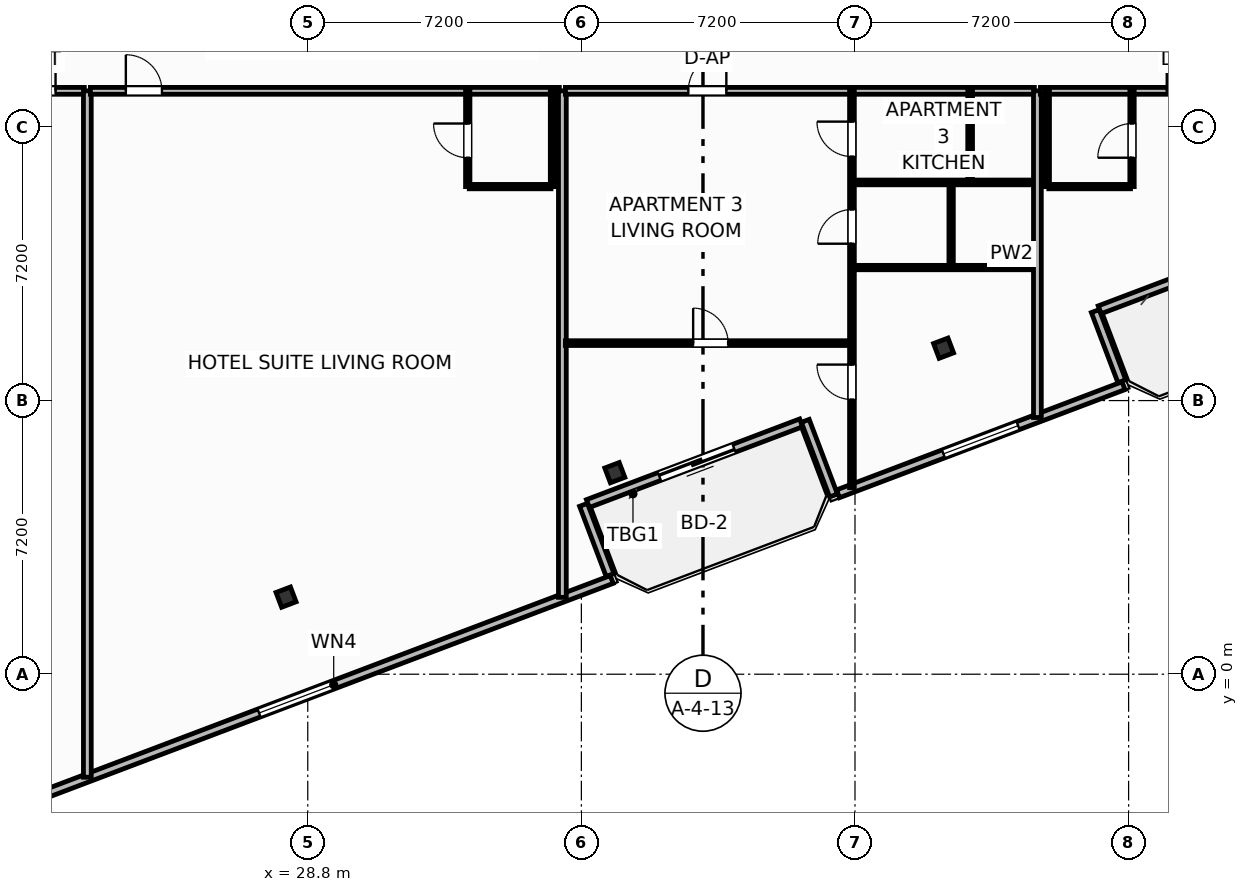
"""IFC4 building model, lengths in metres.
Left out: names, types, materials, properties, quantities, classifications, styles, units other than length and angle.
Written with IfcOpenShell. Run it as: python <this file> out.ifc"""

import sys

from ifc_helpers import new_model, si_unit, direction, frame, frame_2d, origin, origin_2d, place, context, subcontext, project, spatial, rectangle, i_section, extrude, element, fill, save


model = new_model("IFC4")
c1 = context("Model", 3, precision=1e-05, world=origin(), true_north=direction((0.0, 1.0)))
c2 = subcontext(c1, "Body", "Model", "MODEL_VIEW")
j1 = project(units=[si_unit("LENGTHUNIT", "METRE"), si_unit("PLANEANGLEUNIT", "RADIAN")], contexts=[c1])
p1 = place(None, origin())
s1 = spatial("IfcSite", under=j1, at=p1, CompositionType="ELEMENT")
p2 = place(p1, origin())
s2 = spatial("IfcBuilding", under=s1, at=p2, CompositionType="ELEMENT")
p3 = place(p2, frame((0.0, 0.0, 227.5)))
s3 = spatial("IfcBuildingStorey", under=s2, at=p3, CompositionType="ELEMENT", Elevation=227.5)
for number, where, z_axis, x_axis in (
    (1, (28.229, 2.028, 0.0), (0.0, 0.0, 1.0), (0.935, 0.354, 0.0)),
    (2, (36.88, 5.303, 0.0), (0.0, 0.0, 1.0), (0.935, 0.354, 0.0)),
    (3, (45.531, 8.578, 0.0), (0.0, 0.0, 1.0), (0.935, 0.354, 0.0)),
):
    element("IfcColumn", number, at=place(p3, frame(where, z_axis=z_axis, x_axis=x_axis)), inside=s3, PredefinedType="COLUMN", context=c2, shape_type="SweptSolid", body=[
        extrude(i_section(OverallWidth=0.406, OverallDepth=0.416, WebThickness=0.03, FlangeThickness=0.048, FilletRadius=0.025, at=origin_2d()), origin(), (0.0, 0.0, 1.0), 3.7),
    ])
p4 = place(p3, frame((41.783, 6.614, 0.0), z_axis=(0.0, 0.0, 1.0), x_axis=(-0.93521416643, -0.354082565101, 0.0)))
e4 = element("IfcWall", 4, at=p4, inside=s3, PredefinedType="SOLIDWALL", context=c2, shape_type="SweptSolid", body=[
    extrude(rectangle(XDim=6.0, YDim=0.22, at=frame_2d((3.0, 0.0))), origin(), (0.0, 0.0, 1.0), 2.73),
])
p5 = place(p4, frame((1.888, 0.0, 0.0)))
e5 = element("IfcOpeningElement", 5, at=p5, cuts=e4, PredefinedType="OPENING", context=c2, shape_type="SweptSolid", body=[
    extrude(rectangle(XDim=2.1, YDim=2.3, at=frame_2d((1.05, 1.15))), frame((0.0, 0.12, 0.0), z_axis=(0.0, -1.0, 0.0), x_axis=(1.0, 0.0, 0.0)), (0.0, 0.0, 1.0), 0.24),
])
p6 = place(p3, frame((55.25, 11.713, 0.0), z_axis=(0.0, 0.0, 1.0), x_axis=(-0.935227640088, -0.354046976001, 0.0)))
e6 = element("IfcWall", 6, at=p6, inside=s3, PredefinedType="SOLIDWALL", context=c2, shape_type="SweptSolid", body=[
    extrude(rectangle(XDim=6.0, YDim=0.22, at=frame_2d((3.0, 0.0))), origin(), (0.0, 0.0, 1.0), 2.73),
])
p7 = place(p6, frame((1.888, 0.0, 0.0)))
e7 = element("IfcOpeningElement", 7, at=p7, cuts=e6, PredefinedType="OPENING", context=c2, shape_type="SweptSolid", body=[
    extrude(rectangle(XDim=2.1, YDim=2.3, at=frame_2d((1.05, 1.15))), frame((0.0, 0.12, 0.0), z_axis=(0.0, -1.0, 0.0), x_axis=(1.0, 0.0, 0.0)), (0.0, 0.0, 1.0), 0.24),
])
p8 = place(p3, frame((20.202, -3.791, 0.0), z_axis=(0.0, 0.0, 1.0), x_axis=(0.935225574232, 0.354052432984, 0.0)))
e8 = element("IfcWall", 8, at=p8, inside=s3, PredefinedType="SOLIDWALL", context=c2, shape_type="SweptSolid", body=[
    extrude(rectangle(XDim=17.747, YDim=0.22, at=frame_2d((8.874, 0.0))), origin(), (0.0, 0.0, 1.0), 2.73),
])
p9 = place(p8, frame((7.823, 0.0, 0.8)))
e9 = element("IfcOpeningElement", 9, at=p9, cuts=e8, PredefinedType="OPENING", context=c2, shape_type="SweptSolid", body=[
    extrude(rectangle(XDim=2.1, YDim=1.75, at=frame_2d((1.05, 0.875))), frame((0.0, 0.12, 0.0), z_axis=(0.0, -1.0, 0.0), x_axis=(1.0, 0.0, 0.0)), (0.0, 0.0, 1.0), 0.24),
])
p10 = place(p3, frame((36.755, 2.61, 0.0), z_axis=(0.0, 0.0, 1.0), x_axis=(-0.354020680661, 0.935237594232, 0.0)))
e10 = element("IfcWall", 10, at=p10, inside=s3, PredefinedType="SOLIDWALL", context=c2, shape_type="SweptSolid", body=[
    extrude(rectangle(XDim=1.975, YDim=0.22, at=frame_2d((0.988, 0.0))), origin(), (0.0, 0.0, 1.0), 2.73),
])
p11 = place(p3, frame((41.892, 6.666, 0.0), z_axis=(0.0, 0.0, 1.0), x_axis=(0.354128469405, -0.935196785258, 0.0)))
e11 = element("IfcWall", 11, at=p11, inside=s3, PredefinedType="SOLIDWALL", context=c2, shape_type="SweptSolid", body=[
    extrude(rectangle(XDim=2.1, YDim=0.22, at=frame_2d((1.05, 0.0))), origin(), (0.0, 0.0, 1.0), 2.73),
])
p12 = place(p3, frame((42.752, 4.746, 0.0), z_axis=(0.0, 0.0, 1.0), x_axis=(0.935216926991, 0.354075273733, 0.0)))
e12 = element("IfcWall", 12, at=p12, inside=s3, PredefinedType="SOLIDWALL", context=c2, shape_type="SweptSolid", body=[
    extrude(rectangle(XDim=8.035, YDim=0.22, at=frame_2d((4.018, 0.0))), origin(), (0.0, 0.0, 1.0), 2.73),
])
p13 = place(p12, frame((2.968, 0.0, 0.8)))
e13 = element("IfcOpeningElement", 13, at=p13, cuts=e12, PredefinedType="OPENING", context=c2, shape_type="SweptSolid", body=[
    extrude(rectangle(XDim=2.1, YDim=1.75, at=frame_2d((1.05, 0.875))), frame((0.0, 0.12, 0.0), z_axis=(0.0, -1.0, 0.0), x_axis=(1.0, 0.0, 0.0)), (0.0, 0.0, 1.0), 0.24),
])
p14 = place(p3, frame((50.223, 7.708, 0.0), z_axis=(0.0, 0.0, 1.0), x_axis=(-0.354020680661, 0.935237594232, 0.0)))
e14 = element("IfcWall", 14, at=p14, inside=s3, PredefinedType="SOLIDWALL", context=c2, shape_type="SweptSolid", body=[
    extrude(rectangle(XDim=1.975, YDim=0.22, at=frame_2d((0.988, 0.0))), origin(), (0.0, 0.0, 1.0), 2.73),
])
p15 = place(p3, frame((7.764, 15.35, 0.0), z_axis=(0.0, 0.0, 1.0), x_axis=(1.0, 0.0, 0.0)))
e15 = element("IfcWall", 15, at=p15, inside=s3, PredefinedType="PARTITIONING", context=c2, shape_type="SweptSolid", body=[
    extrude(rectangle(XDim=15.156, YDim=0.18, at=frame_2d((7.578, 0.0))), origin(), (0.0, 0.0, 1.0), 3.45),
])
p16 = place(p15, frame((13.45, 0.0, 0.0)))
e16 = element("IfcOpeningElement", 16, at=p16, cuts=e15, PredefinedType="OPENING", context=c2, shape_type="SweptSolid", body=[
    extrude(rectangle(XDim=0.95, YDim=2.15, at=frame_2d((0.475, 1.075))), frame((0.0, 0.1, 0.0), z_axis=(0.0, -1.0, 0.0), x_axis=(1.0, 0.0, 0.0)), (0.0, 0.0, 1.0), 0.2),
])
p17 = place(p3, frame((23.0, -2.71, 0.0), z_axis=(0.0, 0.0, 1.0), x_axis=(0.0, 1.0, 0.0)))
e17 = element("IfcWall", 17, at=p17, inside=s3, PredefinedType="PARTITIONING", context=c2, shape_type="SweptSolid", body=[
    extrude(rectangle(XDim=18.06, YDim=0.205, at=frame_2d((9.03, 0.0))), origin(), (0.0, 0.0, 1.0), 3.45),
])
p18 = place(p3, frame((23.08, 15.35, 0.0), z_axis=(0.0, 0.0, 1.0), x_axis=(1.0, 0.0, 0.0)))
e18 = element("IfcWall", 18, at=p18, inside=s3, PredefinedType="PARTITIONING", context=c2, shape_type="SweptSolid", body=[
    extrude(rectangle(XDim=12.34, YDim=0.18, at=frame_2d((6.17, 0.0))), origin(), (0.0, 0.0, 1.0), 3.45),
])
p19 = place(p18, frame((0.933, 0.0, 0.0)))
e19 = element("IfcOpeningElement", 19, at=p19, cuts=e18, PredefinedType="OPENING", context=c2, shape_type="SweptSolid", body=[
    extrude(rectangle(XDim=0.95, YDim=2.15, at=frame_2d((0.475, 1.075))), frame((0.0, 0.1, 0.0), z_axis=(0.0, -1.0, 0.0), x_axis=(1.0, 0.0, 0.0)), (0.0, 0.0, 1.0), 0.2),
])
p20 = place(p3, frame((33.05, 12.83, 0.0), z_axis=(0.0, 0.0, 1.0), x_axis=(1.0, 0.0, 0.0)))
e20 = element("IfcWall", 20, at=p20, inside=s3, PredefinedType="PARTITIONING", context=c2, shape_type="SweptSolid", body=[
    extrude(rectangle(XDim=2.15, YDim=0.115, at=frame_2d((1.075, 0.0))), origin(), (0.0, 0.0, 1.0), 3.45),
])
p21 = place(p3, frame((33.01, 12.83, 0.0), z_axis=(0.0, 0.0, 1.0), x_axis=(0.0, 1.0, 0.0)))
e21 = element("IfcWall", 21, at=p21, inside=s3, PredefinedType="PARTITIONING", context=c2, shape_type="SweptSolid", body=[
    extrude(rectangle(XDim=2.52, YDim=0.115, at=frame_2d((1.26, 0.0))), origin(), (0.0, 0.0, 1.0), 3.45),
])
p22 = place(p21, frame((0.76, 0.0, 0.0)))
e22 = element("IfcOpeningElement", 22, at=p22, cuts=e21, PredefinedType="OPENING", context=c2, shape_type="SweptSolid", body=[
    extrude(rectangle(XDim=0.9, YDim=2.05, at=frame_2d((0.45, 1.025))), frame((0.0, 0.067, 0.0), z_axis=(0.0, -1.0, 0.0), x_axis=(1.0, 0.0, 0.0)), (0.0, 0.0, 1.0), 0.135),
])
p23 = place(p3, frame((35.24, 12.83, 0.0), z_axis=(0.0, 0.0, 1.0), x_axis=(0.0, 1.0, 0.0)))
e23 = element("IfcWall", 23, at=p23, inside=s3, PredefinedType="PARTITIONING", context=c2, shape_type="SweptSolid", body=[
    extrude(rectangle(XDim=2.52, YDim=0.115, at=frame_2d((1.26, 0.0))), origin(), (0.0, 0.0, 1.0), 2.739),
])
p24 = place(p3, frame((35.5, 2.022, 0.0), z_axis=(0.0, 0.0, 1.0), x_axis=(0.0, 1.0, 0.0)))
e24 = element("IfcWall", 24, at=p24, inside=s3, PredefinedType="PARTITIONING", context=c2, shape_type="SweptSolid", body=[
    extrude(rectangle(XDim=13.328, YDim=0.205, at=frame_2d((6.664, 0.0))), origin(), (0.0, 0.0, 1.0), 2.739),
])
p25 = place(p3, frame((35.58, 8.712, 0.0), z_axis=(0.0, 0.0, 1.0), x_axis=(1.0, 0.0, 0.0)))
e25 = element("IfcWall", 25, at=p25, inside=s3, PredefinedType="PARTITIONING", context=c2, shape_type="SweptSolid", body=[
    extrude(rectangle(XDim=7.47, YDim=0.125, at=frame_2d((3.735, 0.0))), origin(), (0.0, 0.0, 1.0), 3.45),
])
p26 = place(p25, frame((3.362, 0.0, 0.0)))
e26 = element("IfcOpeningElement", 26, at=p26, cuts=e25, PredefinedType="OPENING", context=c2, shape_type="SweptSolid", body=[
    extrude(rectangle(XDim=0.92, YDim=2.05, at=frame_2d((0.46, 1.025))), frame((0.0, 0.073, 0.0), z_axis=(0.0, -1.0, 0.0), x_axis=(1.0, 0.0, 0.0)), (0.0, 0.0, 1.0), 0.145),
])
p27 = place(p3, frame((35.58, 15.35, 0.0), z_axis=(0.0, 0.0, 1.0), x_axis=(1.0, 0.0, 0.0)))
e27 = element("IfcWall", 27, at=p27, inside=s3, PredefinedType="PARTITIONING", context=c2, shape_type="SweptSolid", body=[
    extrude(rectangle(XDim=12.34, YDim=0.18, at=frame_2d((6.17, 0.0))), origin(), (0.0, 0.0, 1.0), 3.45),
])
p28 = place(p27, frame((3.235, 0.0, 0.0)))
e28 = element("IfcOpeningElement", 28, at=p28, cuts=e27, PredefinedType="OPENING", context=c2, shape_type="SweptSolid", body=[
    extrude(rectangle(XDim=1.0, YDim=2.2, at=frame_2d((0.5, 1.1))), frame((0.0, 0.1, 0.0), z_axis=(0.0, -1.0, 0.0), x_axis=(1.0, 0.0, 0.0)), (0.0, 0.0, 1.0), 0.2),
])
p29 = place(p3, frame((43.12, 4.907, 0.0), z_axis=(0.0, 0.0, 1.0), x_axis=(0.0, 1.0, 0.0)))
e29 = element("IfcWall", 29, at=p29, inside=s3, PredefinedType="PARTITIONING", context=c2, shape_type="SweptSolid", body=[
    extrude(rectangle(XDim=10.443, YDim=0.125, at=frame_2d((5.222, 0.0))), origin(), (0.0, 0.0, 1.0), 3.45),
])
p30 = place(p29, frame((2.32, 0.0, 0.0)))
e30 = element("IfcOpeningElement", 30, at=p30, cuts=e29, PredefinedType="OPENING", context=c2, shape_type="SweptSolid", body=[
    extrude(rectangle(XDim=0.92, YDim=2.05, at=frame_2d((0.46, 1.025))), frame((0.0, 0.073, 0.0), z_axis=(0.0, -1.0, 0.0), x_axis=(1.0, 0.0, 0.0)), (0.0, 0.0, 1.0), 0.145),
])
p31 = place(p29, frame((6.42, 0.0, 0.0)))
e31 = element("IfcOpeningElement", 31, at=p31, cuts=e29, PredefinedType="OPENING", context=c2, shape_type="SweptSolid", body=[
    extrude(rectangle(XDim=0.9, YDim=2.05, at=frame_2d((0.45, 1.025))), frame((0.0, 0.073, 0.0), z_axis=(0.0, -1.0, 0.0), x_axis=(1.0, 0.0, 0.0)), (0.0, 0.0, 1.0), 0.145),
])
p32 = place(p29, frame((8.713, 0.0, 0.0)))
e32 = element("IfcOpeningElement", 32, at=p32, cuts=e29, PredefinedType="OPENING", context=c2, shape_type="SweptSolid", body=[
    extrude(rectangle(XDim=0.92, YDim=2.05, at=frame_2d((0.46, 1.025))), frame((0.0, 0.073, 0.0), z_axis=(0.0, -1.0, 0.0), x_axis=(1.0, 0.0, 0.0)), (0.0, 0.0, 1.0), 0.145),
])
p33 = place(p3, frame((43.19, 12.94, 0.0), z_axis=(0.0, 0.0, 1.0), x_axis=(1.0, 0.0, 0.0)))
e33 = element("IfcWall", 33, at=p33, inside=s3, PredefinedType="PARTITIONING", context=c2, shape_type="SweptSolid", body=[
    extrude(rectangle(XDim=4.73, YDim=0.125, at=frame_2d((2.365, 0.0))), origin(), (0.0, 0.0, 1.0), 3.018),
])
p34 = place(p3, frame((43.19, 10.7, 0.0), z_axis=(0.0, 0.0, 1.0), x_axis=(1.0, 0.0, 0.0)))
e34 = element("IfcWall", 34, at=p34, inside=s3, PredefinedType="PARTITIONING", context=c2, shape_type="SweptSolid", body=[
    extrude(rectangle(XDim=4.73, YDim=0.115, at=frame_2d((2.365, 0.0))), origin(), (0.0, 0.0, 1.0), 3.45),
])
p35 = place(p3, frame((46.23, 12.94, 0.0), z_axis=(0.0, 0.0, 1.0), x_axis=(0.0, 1.0, 0.0)))
e35 = element("IfcWall", 35, at=p35, inside=s3, PredefinedType="PARTITIONING", context=c2, shape_type="SweptSolid", body=[
    extrude(rectangle(XDim=2.41, YDim=0.125, at=frame_2d((1.205, 0.0))), origin(), (0.0, 0.0, 1.0), 3.45),
])
p36 = place(p3, frame((45.73, 10.7, 0.0), z_axis=(0.0, 0.0, 1.0), x_axis=(0.0, 1.0, 0.0)))
e36 = element("IfcWall", 36, at=p36, inside=s3, PredefinedType="PARTITIONING", context=c2, shape_type="SweptSolid", body=[
    extrude(rectangle(XDim=2.24, YDim=0.115, at=frame_2d((1.12, 0.0))), origin(), (0.0, 0.0, 1.0), 3.45),
])
p37 = place(p3, frame((48.0, 6.754, 0.0), z_axis=(0.0, 0.0, 1.0), x_axis=(0.0, 1.0, 0.0)))
e37 = element("IfcWall", 37, at=p37, inside=s3, PredefinedType="PARTITIONING", context=c2, shape_type="SweptSolid", body=[
    extrude(rectangle(XDim=8.596, YDim=0.205, at=frame_2d((4.298, 0.0))), origin(), (0.0, 0.0, 1.0), 3.45),
])
p38 = place(p3, frame((48.08, 15.35, 0.0), z_axis=(0.0, 0.0, 1.0), x_axis=(1.0, 0.0, 0.0)))
e38 = element("IfcWall", 38, at=p38, inside=s3, PredefinedType="PARTITIONING", context=c2, shape_type="SweptSolid", body=[
    extrude(rectangle(XDim=22.624, YDim=0.18, at=frame_2d((11.312, 0.0))), origin(), (0.0, 0.0, 1.0), 3.45),
])
p39 = place(p38, frame((3.324, 0.0, 0.0)))
e39 = element("IfcOpeningElement", 39, at=p39, cuts=e38, PredefinedType="OPENING", context=c2, shape_type="SweptSolid", body=[
    extrude(rectangle(XDim=0.95, YDim=2.15, at=frame_2d((0.475, 1.075))), frame((0.0, 0.1, 0.0), z_axis=(0.0, -1.0, 0.0), x_axis=(1.0, 0.0, 0.0)), (0.0, 0.0, 1.0), 0.2),
])
p40 = place(p3, frame((48.3, 12.83, 0.0), z_axis=(0.0, 0.0, 1.0), x_axis=(1.0, 0.0, 0.0)))
e40 = element("IfcWall", 40, at=p40, inside=s3, PredefinedType="PARTITIONING", context=c2, shape_type="SweptSolid", body=[
    extrude(rectangle(XDim=2.15, YDim=0.115, at=frame_2d((1.075, 0.0))), origin(), (0.0, 0.0, 1.0), 3.45),
])
p41 = place(p3, frame((50.49, 12.83, 0.0), z_axis=(0.0, 0.0, 1.0), x_axis=(0.0, 1.0, 0.0)))
e41 = element("IfcWall", 41, at=p41, inside=s3, PredefinedType="PARTITIONING", context=c2, shape_type="SweptSolid", body=[
    extrude(rectangle(XDim=2.52, YDim=0.115, at=frame_2d((1.26, 0.0))), origin(), (0.0, 0.0, 1.0), 3.45),
])
p42 = place(p41, frame((0.76, 0.0, 0.0)))
e42 = element("IfcOpeningElement", 42, at=p42, cuts=e41, PredefinedType="OPENING", context=c2, shape_type="SweptSolid", body=[
    extrude(rectangle(XDim=0.9, YDim=2.05, at=frame_2d((0.45, 1.025))), frame((0.0, 0.067, 0.0), z_axis=(0.0, -1.0, 0.0), x_axis=(1.0, 0.0, 0.0)), (0.0, 0.0, 1.0), 0.135),
])
p43 = place(p3, frame((48.26, 12.83, 0.0), z_axis=(0.0, 0.0, 1.0), x_axis=(0.0, 1.0, 0.0)))
e43 = element("IfcWall", 43, at=p43, inside=s3, PredefinedType="PARTITIONING", context=c2, shape_type="SweptSolid", body=[
    extrude(rectangle(XDim=2.52, YDim=0.115, at=frame_2d((1.26, 0.0))), origin(), (0.0, 0.0, 1.0), 3.45),
])
p44 = place(p5, origin())
e44 = element("IfcDoor", 44, at=p44, inside=s3, OperationType="SLIDING_TO_LEFT", PredefinedType="DOOR", context=c2, shape_type="SweptSolid", body=[
    extrude(rectangle(XDim=2.1, YDim=2.3, at=frame_2d((1.05, 1.15))), frame((0.0, 0.025, 0.0), z_axis=(0.0, -1.0, 0.0), x_axis=(1.0, 0.0, 0.0)), (0.0, 0.0, 1.0), 0.05),
])
fill(e5, e44)
p45 = place(p9, origin())
e45 = element("IfcWindow", 45, at=p45, inside=s3, PartitioningType="SINGLE_PANEL", PredefinedType="WINDOW", context=c2, shape_type="SweptSolid", body=[
    extrude(rectangle(XDim=2.1, YDim=1.75, at=frame_2d((1.05, 0.875))), frame((0.0, 0.03, 0.0), z_axis=(0.0, -1.0, 0.0), x_axis=(1.0, 0.0, 0.0)), (0.0, 0.0, 1.0), 0.06),
])
fill(e9, e45)
p46 = place(p13, origin())
e46 = element("IfcWindow", 46, at=p46, inside=s3, PartitioningType="SINGLE_PANEL", PredefinedType="WINDOW", context=c2, shape_type="SweptSolid", body=[
    extrude(rectangle(XDim=2.1, YDim=1.75, at=frame_2d((1.05, 0.875))), frame((0.0, 0.03, 0.0), z_axis=(0.0, -1.0, 0.0), x_axis=(1.0, 0.0, 0.0)), (0.0, 0.0, 1.0), 0.06),
])
fill(e13, e46)
p47 = place(p16, origin())
e47 = element("IfcDoor", 47, at=p47, inside=s3, OperationType="SINGLE_SWING_RIGHT", PredefinedType="DOOR", context=c2, shape_type="SweptSolid", body=[
    extrude(rectangle(XDim=0.95, YDim=2.15, at=frame_2d((0.475, 1.075))), frame((0.0, 0.025, 0.0), z_axis=(0.0, -1.0, 0.0), x_axis=(1.0, 0.0, 0.0)), (0.0, 0.0, 1.0), 0.05),
])
fill(e16, e47)
p48 = place(p19, origin())
e48 = element("IfcDoor", 48, at=p48, inside=s3, OperationType="SINGLE_SWING_LEFT", PredefinedType="DOOR", context=c2, shape_type="SweptSolid", body=[
    extrude(rectangle(XDim=0.95, YDim=2.15, at=frame_2d((0.475, 1.075))), frame((0.0, 0.025, 0.0), z_axis=(0.0, -1.0, 0.0), x_axis=(1.0, 0.0, 0.0)), (0.0, 0.0, 1.0), 0.05),
])
fill(e19, e48)
p49 = place(p22, origin())
e49 = element("IfcDoor", 49, at=p49, inside=s3, OperationType="SINGLE_SWING_RIGHT", PredefinedType="DOOR", context=c2, shape_type="SweptSolid", body=[
    extrude(rectangle(XDim=0.9, YDim=2.05, at=frame_2d((0.45, 1.025))), frame((0.0, 0.025, 0.0), z_axis=(0.0, -1.0, 0.0), x_axis=(1.0, 0.0, 0.0)), (0.0, 0.0, 1.0), 0.05),
])
fill(e22, e49)
p50 = place(p26, origin())
e50 = element("IfcDoor", 50, at=p50, inside=s3, OperationType="SINGLE_SWING_LEFT", PredefinedType="DOOR", context=c2, shape_type="SweptSolid", body=[
    extrude(rectangle(XDim=0.92, YDim=2.05, at=frame_2d((0.46, 1.025))), frame((0.0, 0.025, 0.0), z_axis=(0.0, -1.0, 0.0), x_axis=(1.0, 0.0, 0.0)), (0.0, 0.0, 1.0), 0.05),
])
fill(e26, e50)
p51 = place(p28, origin())
e51 = element("IfcDoor", 51, at=p51, inside=s3, OperationType="SINGLE_SWING_RIGHT", PredefinedType="DOOR", context=c2, shape_type="SweptSolid", body=[
    extrude(rectangle(XDim=1.0, YDim=2.2, at=frame_2d((0.5, 1.1))), frame((0.0, 0.025, 0.0), z_axis=(0.0, -1.0, 0.0), x_axis=(1.0, 0.0, 0.0)), (0.0, 0.0, 1.0), 0.05),
])
fill(e28, e51)
p52 = place(p30, origin())
e52 = element("IfcDoor", 52, at=p52, inside=s3, OperationType="SINGLE_SWING_RIGHT", PredefinedType="DOOR", context=c2, shape_type="SweptSolid", body=[
    extrude(rectangle(XDim=0.92, YDim=2.05, at=frame_2d((0.46, 1.025))), frame((0.0, 0.025, 0.0), z_axis=(0.0, -1.0, 0.0), x_axis=(1.0, 0.0, 0.0)), (0.0, 0.0, 1.0), 0.05),
])
fill(e30, e52)
p53 = place(p31, origin())
e53 = element("IfcDoor", 53, at=p53, inside=s3, OperationType="SINGLE_SWING_LEFT", PredefinedType="DOOR", context=c2, shape_type="SweptSolid", body=[
    extrude(rectangle(XDim=0.9, YDim=2.05, at=frame_2d((0.45, 1.025))), frame((0.0, 0.025, 0.0), z_axis=(0.0, -1.0, 0.0), x_axis=(1.0, 0.0, 0.0)), (0.0, 0.0, 1.0), 0.05),
])
fill(e31, e53)
p54 = place(p32, origin())
e54 = element("IfcDoor", 54, at=p54, inside=s3, OperationType="SINGLE_SWING_RIGHT", PredefinedType="DOOR", context=c2, shape_type="SweptSolid", body=[
    extrude(rectangle(XDim=0.92, YDim=2.05, at=frame_2d((0.46, 1.025))), frame((0.0, 0.025, 0.0), z_axis=(0.0, -1.0, 0.0), x_axis=(1.0, 0.0, 0.0)), (0.0, 0.0, 1.0), 0.05),
])
fill(e32, e54)
p55 = place(p39, origin())
e55 = element("IfcDoor", 55, at=p55, inside=s3, OperationType="SINGLE_SWING_LEFT", PredefinedType="DOOR", context=c2, shape_type="SweptSolid", body=[
    extrude(rectangle(XDim=0.95, YDim=2.15, at=frame_2d((0.475, 1.075))), frame((0.0, 0.025, 0.0), z_axis=(0.0, -1.0, 0.0), x_axis=(1.0, 0.0, 0.0)), (0.0, 0.0, 1.0), 0.05),
])
fill(e39, e55)
p56 = place(p42, origin())
e56 = element("IfcDoor", 56, at=p56, inside=s3, OperationType="SINGLE_SWING_LEFT", PredefinedType="DOOR", context=c2, shape_type="SweptSolid", body=[
    extrude(rectangle(XDim=0.9, YDim=2.05, at=frame_2d((0.45, 1.025))), frame((0.0, 0.025, 0.0), z_axis=(0.0, -1.0, 0.0), x_axis=(1.0, 0.0, 0.0)), (0.0, 0.0, 1.0), 0.05),
])
fill(e42, e56)
save(model, sys.argv[1])
